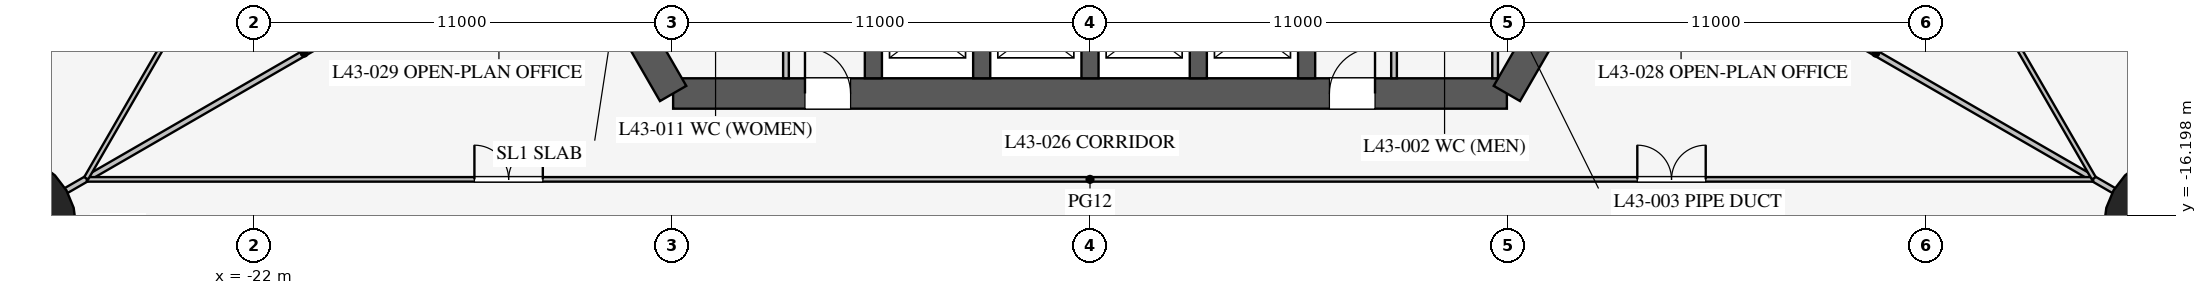
"""IFC4 building model, lengths in metres.
Left out: names, types, materials, properties, quantities, classifications, styles, units other than length and angle.
Written with IfcOpenShell. Run it as: python <this file> out.ifc"""

import sys

from ifc_helpers import new_model, si_unit, direction, frame, frame_2d, origin, origin_2d, place, context, subcontext, project, spatial, rectangle, circle, extrude, element, fill, save


model = new_model("IFC4")
c1 = context("Model", 3, precision=1e-05, world=origin(), true_north=direction((0.0, 1.0)))
c2 = subcontext(c1, "Body", "Model", "MODEL_VIEW")
j1 = project(units=[si_unit("LENGTHUNIT", "METRE"), si_unit("PLANEANGLEUNIT", "RADIAN")], contexts=[c1])
p1 = place(None, origin())
s1 = spatial("IfcSite", under=j1, at=p1, CompositionType="ELEMENT")
p2 = place(p1, origin())
s2 = spatial("IfcBuilding", under=s1, at=p2, CompositionType="ELEMENT")
p3 = place(p2, frame((0.0, 0.0, 189.7)))
s3 = spatial("IfcBuildingStorey", under=s2, at=p3, CompositionType="ELEMENT", Elevation=189.7)
for number, where, z_axis, x_axis in (
    (1, (28.579, -16.5, 0.0), (0.0, 0.0, 1.0), (1.0, 0.0, 0.0)),
    (2, (-28.579, -16.5, 0.0), (0.0, 0.0, 1.0), (1.0, 0.0, 0.0)),
):
    element("IfcColumn", number, at=place(p3, frame(where, z_axis=z_axis, x_axis=x_axis)), inside=s3, PredefinedType="COLUMN", context=c2, shape_type="SweptSolid", body=[
        extrude(circle(Radius=1.9, at=origin_2d()), origin(), (0.0, 0.0, 1.0), 4.2),
    ])
p4 = place(p3, frame((-10.97, -13.0, 0.0), z_axis=(0.0, 0.0, 1.0), x_axis=(1.0, 0.0, 0.0)))
e3 = element("IfcWall", 3, at=p4, inside=s3, PredefinedType="SHEAR", context=c2, shape_type="SweptSolid", body=[
    extrude(rectangle(XDim=21.939, YDim=0.8, at=frame_2d((10.97, 0.0))), origin(), (0.0, 0.0, 1.0), 4.2),
])
p5 = place(p4, frame((17.27, 0.0, 0.0)))
e4 = element("IfcOpeningElement", 4, at=p5, cuts=e3, PredefinedType="OPENING", context=c2, shape_type="SweptSolid", body=[
    extrude(rectangle(XDim=1.2, YDim=2.1, at=frame_2d((0.6, 1.05))), frame((0.0, 0.41, 0.0), z_axis=(0.0, -1.0, 0.0), x_axis=(1.0, 0.0, 0.0)), (0.0, 0.0, 1.0), 0.82),
])
p6 = place(p4, frame((3.47, 0.0, 0.0)))
e5 = element("IfcOpeningElement", 5, at=p6, cuts=e3, PredefinedType="OPENING", context=c2, shape_type="SweptSolid", body=[
    extrude(rectangle(XDim=1.2, YDim=2.1, at=frame_2d((0.6, 1.05))), frame((0.0, 0.41, 0.0), z_axis=(0.0, -1.0, 0.0), x_axis=(1.0, 0.0, 0.0)), (0.0, 0.0, 1.0), 0.82),
])
for number, where, z_axis, x_axis in (
    (6, (10.97, -13.0, 0.0), (0.0, 0.0, 1.0), (0.5, 0.866, 0.0)),
    (7, (-16.743, -3.0, 0.0), (0.0, 0.0, 1.0), (0.5, -0.866, 0.0)),
):
    element("IfcWall", number, at=place(p3, frame(where, z_axis=z_axis, x_axis=x_axis)), inside=s3, PredefinedType="SHEAR", context=c2, shape_type="SweptSolid", body=[
        extrude(rectangle(XDim=11.547, YDim=0.8, at=frame_2d((5.773, 0.0))), origin(), (0.0, 0.0, 1.0), 4.2),
    ])
for number, where, z_axis, x_axis in (
    (8, (-5.7, -10.025, 0.0), (0.0, 0.0, 1.0), (0.0, -1.0, 0.0)),
    (9, (-2.85, -10.025, 0.0), (0.0, 0.0, 1.0), (0.0, -1.0, 0.0)),
    (10, (0.0, -10.025, 0.0), (0.0, 0.0, 1.0), (0.0, -1.0, 0.0)),
    (11, (2.85, -10.025, 0.0), (0.0, 0.0, 1.0), (0.0, -1.0, 0.0)),
    (12, (5.7, -10.025, 0.0), (0.0, 0.0, 1.0), (0.0, -1.0, 0.0)),
):
    element("IfcWall", number, at=place(p3, frame(where, z_axis=z_axis, x_axis=x_axis)), inside=s3, PredefinedType="SHEAR", context=c2, shape_type="SweptSolid", body=[
        extrude(rectangle(XDim=2.575, YDim=0.45, at=frame_2d((1.288, 0.0))), origin(), (0.0, 0.0, 1.0), 4.2),
    ])
p7 = place(p3, frame((8.0, -7.5, 0.0), z_axis=(0.0, 0.0, 1.0), x_axis=(0.0, -1.0, 0.0)))
e13 = element("IfcWall", 13, at=p7, inside=s3, PredefinedType="PARTITIONING", context=c2, shape_type="SweptSolid", body=[
    extrude(rectangle(XDim=5.1, YDim=0.15, at=frame_2d((2.55, 0.0))), origin(), (0.0, 0.0, 1.0), 4.0),
])
p8 = place(p7, frame((1.3, 0.0, 0.0)))
e14 = element("IfcOpeningElement", 14, at=p8, cuts=e13, PredefinedType="OPENING", context=c2, shape_type="SweptSolid", body=[
    extrude(rectangle(XDim=0.9, YDim=2.1, at=frame_2d((0.45, 1.05))), frame((0.0, 0.085, 0.0), z_axis=(0.0, -1.0, 0.0), x_axis=(1.0, 0.0, 0.0)), (0.0, 0.0, 1.0), 0.17),
])
p9 = place(p3, frame((-8.0, -7.5, 0.0), z_axis=(0.0, 0.0, 1.0), x_axis=(0.0, -1.0, 0.0)))
e15 = element("IfcWall", 15, at=p9, inside=s3, PredefinedType="PARTITIONING", context=c2, shape_type="SweptSolid", body=[
    extrude(rectangle(XDim=5.1, YDim=0.15, at=frame_2d((2.55, 0.0))), origin(), (0.0, 0.0, 1.0), 4.0),
])
p10 = place(p9, frame((2.6, 0.0, 0.0)))
e16 = element("IfcOpeningElement", 16, at=p10, cuts=e15, PredefinedType="OPENING", context=c2, shape_type="SweptSolid", body=[
    extrude(rectangle(XDim=0.9, YDim=2.1, at=frame_2d((0.45, 1.05))), frame((0.0, 0.085, 0.0), z_axis=(0.0, -1.0, 0.0), x_axis=(1.0, 0.0, 0.0)), (0.0, 0.0, 1.0), 0.17),
])
p11 = place(p3, frame((10.66, -8.5, 0.0), z_axis=(0.0, 0.0, 1.0), x_axis=(0.0, -1.0, 0.0)))
e17 = element("IfcWall", 17, at=p11, inside=s3, PredefinedType="PARTITIONING", context=c2, shape_type="SweptSolid", body=[
    extrude(rectangle(XDim=4.1, YDim=0.15, at=frame_2d((2.05, 0.0))), origin(), (0.0, 0.0, 1.0), 4.0),
])
for number, where, z_axis, x_axis in (
    (18, (14.203, -8.2, 0.0), (0.0, 0.0, 1.0), (0.866, -0.5, 0.0)),
    (19, (-14.203, -8.2, 0.0), (0.0, 0.0, 1.0), (-0.866, -0.5, 0.0)),
):
    element("IfcWall", number, at=place(p3, frame(where, z_axis=z_axis, x_axis=x_axis)), inside=s3, PredefinedType="PARTITIONING", context=c2, shape_type="SweptSolid", body=[
        extrude(rectangle(XDim=14.95, YDim=0.15, at=frame_2d((7.475, 0.0))), origin(), (0.0, 0.0, 1.0), 2.4),
    ])
p12 = place(p3, frame((-26.398, -15.26, 0.0), z_axis=(0.0, 0.0, 1.0), x_axis=(1.0, 0.0, 0.0)))
e20 = element("IfcWall", 20, at=p12, inside=s3, PredefinedType="PARTITIONING", context=c2, shape_type="SweptSolid", body=[
    extrude(rectangle(XDim=52.796, YDim=0.12, at=frame_2d((26.398, 0.0))), origin(), (0.0, 0.0, 1.0), 2.9),
])
p13 = place(p12, frame((10.2, 0.0, 0.15)))
e21 = element("IfcOpeningElement", 21, at=p13, cuts=e20, PredefinedType="OPENING", context=c2, shape_type="SweptSolid", body=[
    extrude(rectangle(XDim=1.8, YDim=2.1, at=frame_2d((0.9, 1.05))), frame((0.0, 0.07, 0.0), z_axis=(0.0, -1.0, 0.0), x_axis=(1.0, 0.0, 0.0)), (0.0, 0.0, 1.0), 0.14),
])
p14 = place(p12, frame((40.8, 0.0, 0.15)))
e22 = element("IfcOpeningElement", 22, at=p14, cuts=e20, PredefinedType="OPENING", context=c2, shape_type="SweptSolid", body=[
    extrude(rectangle(XDim=1.8, YDim=2.1, at=frame_2d((0.9, 1.05))), frame((0.0, 0.07, 0.0), z_axis=(0.0, -1.0, 0.0), x_axis=(1.0, 0.0, 0.0)), (0.0, 0.0, 1.0), 0.14),
])
p15 = place(p3, frame((26.415, -15.231, 0.0), z_axis=(0.0, 0.0, 1.0), x_axis=(-0.50000091641, 0.866024874695, 0.0)))
e23 = element("IfcWall", 23, at=p15, inside=s3, PredefinedType="PARTITIONING", context=c2, shape_type="SweptSolid", body=[
    extrude(rectangle(XDim=52.796, YDim=0.12, at=frame_2d((26.398, 0.0))), origin(), (0.0, 0.0, 1.0), 2.9),
])
p16 = place(p15, frame((10.2, 0.0, 0.15)))
e24 = element("IfcOpeningElement", 24, at=p16, cuts=e23, PredefinedType="OPENING", context=c2, shape_type="SweptSolid", body=[
    extrude(rectangle(XDim=1.8, YDim=2.1, at=frame_2d((0.9, 1.05))), frame((0.0, 0.07, 0.0), z_axis=(0.0, -1.0, 0.0), x_axis=(1.0, 0.0, 0.0)), (0.0, 0.0, 1.0), 0.14),
])
p17 = place(p15, frame((40.8, 0.0, 0.15)))
e25 = element("IfcOpeningElement", 25, at=p17, cuts=e23, PredefinedType="OPENING", context=c2, shape_type="SweptSolid", body=[
    extrude(rectangle(XDim=1.8, YDim=2.1, at=frame_2d((0.9, 1.05))), frame((0.0, 0.07, 0.0), z_axis=(0.0, -1.0, 0.0), x_axis=(1.0, 0.0, 0.0)), (0.0, 0.0, 1.0), 0.14),
])
p18 = place(p3, frame((-0.016, 30.491, 0.0), z_axis=(0.0, 0.0, 1.0), x_axis=(-0.50000091641, -0.866024874695, 0.0)))
e26 = element("IfcWall", 26, at=p18, inside=s3, PredefinedType="PARTITIONING", context=c2, shape_type="SweptSolid", body=[
    extrude(rectangle(XDim=52.796, YDim=0.12, at=frame_2d((26.398, 0.0))), origin(), (0.0, 0.0, 1.0), 2.9),
])
p19 = place(p18, frame((10.2, 0.0, 0.15)))
e27 = element("IfcOpeningElement", 27, at=p19, cuts=e26, PredefinedType="OPENING", context=c2, shape_type="SweptSolid", body=[
    extrude(rectangle(XDim=1.8, YDim=2.1, at=frame_2d((0.9, 1.05))), frame((0.0, 0.07, 0.0), z_axis=(0.0, -1.0, 0.0), x_axis=(1.0, 0.0, 0.0)), (0.0, 0.0, 1.0), 0.14),
])
p20 = place(p18, frame((40.8, 0.0, 0.15)))
e28 = element("IfcOpeningElement", 28, at=p20, cuts=e26, PredefinedType="OPENING", context=c2, shape_type="SweptSolid", body=[
    extrude(rectangle(XDim=1.8, YDim=2.1, at=frame_2d((0.9, 1.05))), frame((0.0, 0.07, 0.0), z_axis=(0.0, -1.0, 0.0), x_axis=(1.0, 0.0, 0.0)), (0.0, 0.0, 1.0), 0.14),
])
p21 = place(p5, origin())
e29 = element("IfcDoor", 29, at=p21, inside=s3, OperationType="SINGLE_SWING_RIGHT", PredefinedType="DOOR", context=c2, shape_type="SweptSolid", body=[
    extrude(rectangle(XDim=1.2, YDim=2.1, at=frame_2d((0.6, 1.05))), frame((0.0, 0.025, 0.0), z_axis=(0.0, -1.0, 0.0), x_axis=(1.0, 0.0, 0.0)), (0.0, 0.0, 1.0), 0.05),
])
fill(e4, e29)
p22 = place(p6, origin())
e30 = element("IfcDoor", 30, at=p22, inside=s3, OperationType="SINGLE_SWING_LEFT", PredefinedType="DOOR", context=c2, shape_type="SweptSolid", body=[
    extrude(rectangle(XDim=1.2, YDim=2.1, at=frame_2d((0.6, 1.05))), frame((0.0, 0.025, 0.0), z_axis=(0.0, -1.0, 0.0), x_axis=(1.0, 0.0, 0.0)), (0.0, 0.0, 1.0), 0.05),
])
fill(e5, e30)
p23 = place(p13, origin())
e31 = element("IfcDoor", 31, at=p23, inside=s3, OperationType="DOUBLE_DOOR_SINGLE_SWING", PredefinedType="DOOR", context=c2, shape_type="SweptSolid", body=[
    extrude(rectangle(XDim=1.8, YDim=2.1, at=frame_2d((0.9, 1.05))), frame((0.0, 0.025, 0.0), z_axis=(0.0, -1.0, 0.0), x_axis=(1.0, 0.0, 0.0)), (0.0, 0.0, 1.0), 0.05),
])
fill(e21, e31)
p24 = place(p14, origin())
e32 = element("IfcDoor", 32, at=p24, inside=s3, OperationType="DOUBLE_DOOR_SINGLE_SWING", PredefinedType="DOOR", context=c2, shape_type="SweptSolid", body=[
    extrude(rectangle(XDim=1.8, YDim=2.1, at=frame_2d((0.9, 1.05))), frame((0.0, 0.025, 0.0), z_axis=(0.0, -1.0, 0.0), x_axis=(1.0, 0.0, 0.0)), (0.0, 0.0, 1.0), 0.05),
])
fill(e22, e32)
save(model, sys.argv[1])
